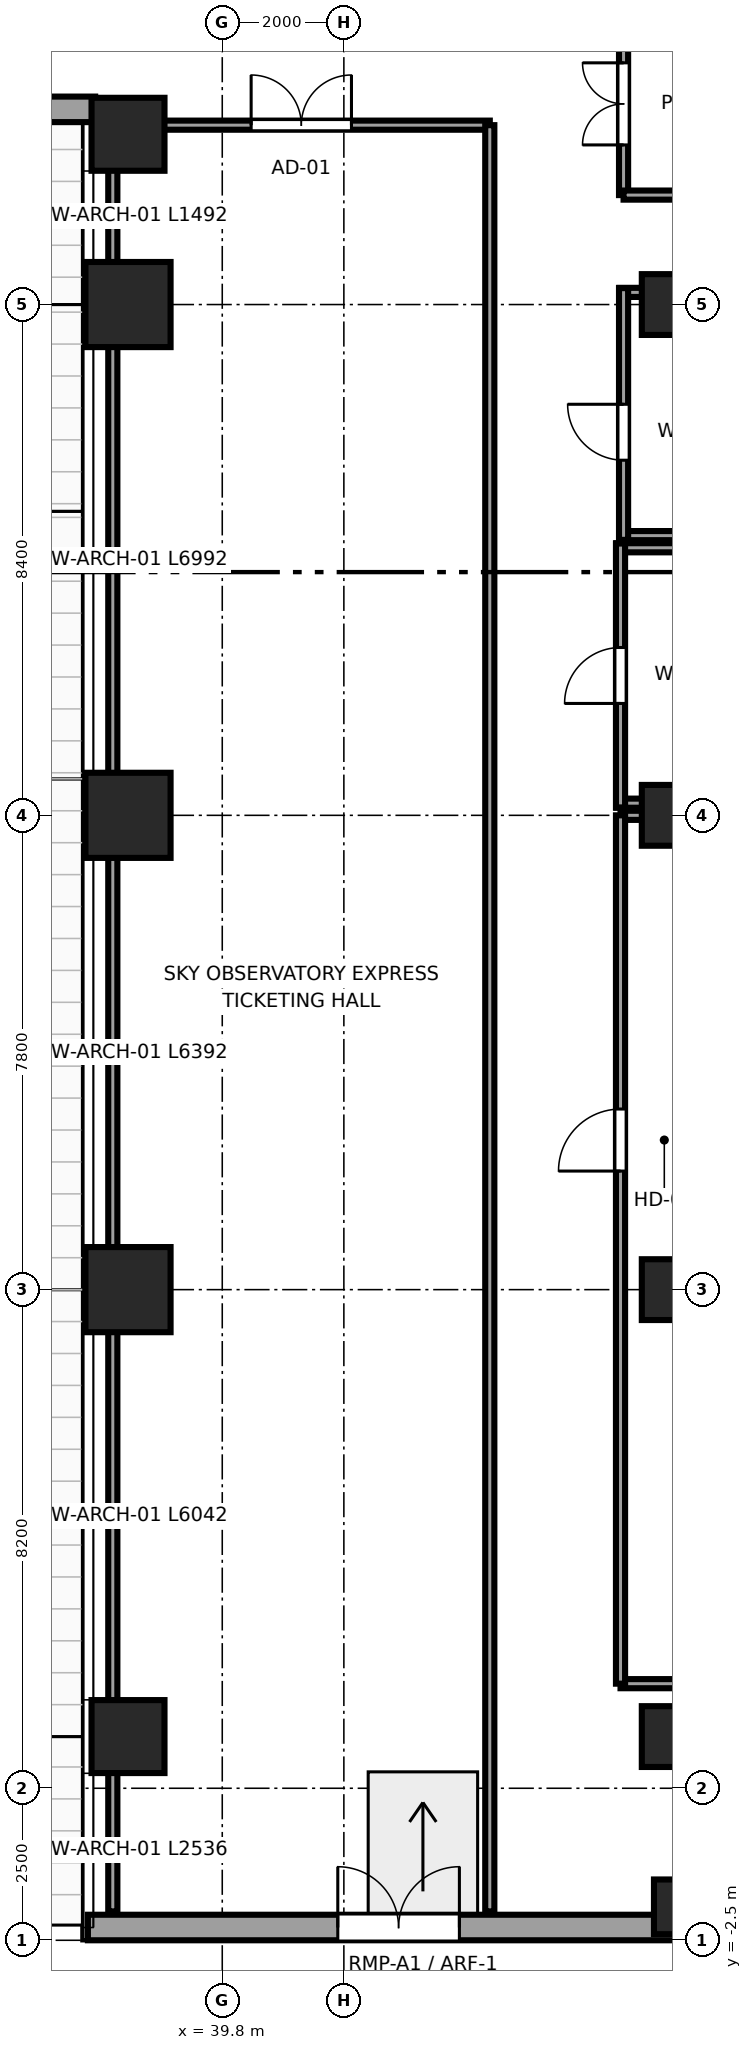
"""IFC4 building model, lengths in metres.
Left out: names, types, materials, properties, quantities, classifications, styles, units other than length and angle.
Written with IfcOpenShell. Run it as: python <this file> out.ifc"""

import sys

from ifc_helpers import new_model, si_unit, direction, frame, frame_2d, origin, origin_2d, place, context, subcontext, project, spatial, rectangle, circle, extrude, source, transform, mapped, element, fill, save


model = new_model("IFC4")
c1 = context("Model", 3, precision=1e-05, world=origin(), true_north=direction((0.0, 1.0)))
c2 = subcontext(c1, "Body", "Model", "MODEL_VIEW")
j1 = project(units=[si_unit("LENGTHUNIT", "METRE"), si_unit("PLANEANGLEUNIT", "RADIAN")], contexts=[c1])
p1 = place(None, origin())
s1 = spatial("IfcSite", under=j1, at=p1, CompositionType="ELEMENT")
p2 = place(p1, origin())
s2 = spatial("IfcBuilding", under=s1, at=p2, CompositionType="ELEMENT")
p3 = place(p2, origin())
s3 = spatial("IfcBuildingStorey", under=s2, at=p3, CompositionType="ELEMENT", Elevation=0.0)
m1 = source(origin(), c2, "Body", "SweptSolid", [
    extrude(circle(Radius=0.6, at=origin_2d()), origin(), (0.0, 0.0, 1.0), 6.0),
])
p4 = place(p3, frame((38.25, 0.85, 0.0), z_axis=(0.0, 0.0, 1.0), x_axis=(1.0, 0.0, 0.0)))
e1 = element("IfcColumn", 1, at=p4, inside=s3, PredefinedType="COLUMN", context=c2, shape_type="MappedRepresentation", body=[
    mapped(m1, transform((0.0, 0.0, 0.0), x_axis=(1.0, 0.0, 0.0), y_axis=(0.0, 1.0, 0.0), z_axis=(0.0, 0.0, 1.0), scale=1.0)),
])
m2 = source(origin(), c2, "Body", "SweptSolid", [
    extrude(rectangle(XDim=1.4, YDim=1.4, at=origin_2d()), origin(), (0.0, 0.0, 1.0), 6.0),
])
for number, where, z_axis, x_axis in (
    (2, (38.25, 8.2, 0.0), (0.0, 0.0, 1.0), (1.0, 0.0, 0.0)),
    (3, (38.25, 16.0, 0.0), (0.0, 0.0, 1.0), (1.0, 0.0, 0.0)),
    (4, (38.25, 24.4, 0.0), (0.0, 0.0, 1.0), (1.0, 0.0, 0.0)),
):
    element("IfcColumn", number, at=place(p3, frame(where, z_axis=z_axis, x_axis=x_axis)), inside=s3, PredefinedType="COLUMN", context=c2, shape_type="MappedRepresentation", body=[
        mapped(m2, transform((0.0, 0.0, 0.0), x_axis=(1.0, 0.0, 0.0), y_axis=(0.0, 1.0, 0.0), z_axis=(0.0, 0.0, 1.0), scale=1.0)),
    ])
p5 = place(p3, frame((38.25, 27.2, 0.0), z_axis=(0.0, 0.0, 1.0), x_axis=(1.0, 0.0, 0.0)))
e5 = element("IfcColumn", 5, at=p5, inside=s3, PredefinedType="COLUMN", context=c2, shape_type="MappedRepresentation", body=[
    mapped(m1, transform((0.0, 0.0, 0.0), x_axis=(1.0, 0.0, 0.0), y_axis=(0.0, 1.0, 0.0), z_axis=(0.0, 0.0, 1.0), scale=1.0)),
])
m3 = source(origin(), c2, "Body", "SweptSolid", [
    extrude(rectangle(XDim=1.0, YDim=1.0, at=origin_2d()), origin(), (0.0, 0.0, 1.0), 6.0),
])
for number, where, z_axis, x_axis in (
    (6, (47.2, 0.85, 0.0), (0.0, 0.0, 1.0), (1.0, 0.0, 0.0)),
    (7, (47.2, 8.2, 0.0), (0.0, 0.0, 1.0), (1.0, 0.0, 0.0)),
    (8, (47.2, 16.0, 0.0), (0.0, 0.0, 1.0), (1.0, 0.0, 0.0)),
    (9, (47.2, 24.4, 0.0), (0.0, 0.0, 1.0), (1.0, 0.0, 0.0)),
):
    element("IfcColumn", number, at=place(p3, frame(where, z_axis=z_axis, x_axis=x_axis)), inside=s3, PredefinedType="COLUMN", context=c2, shape_type="MappedRepresentation", body=[
        mapped(m3, transform((0.0, 0.0, 0.0), x_axis=(1.0, 0.0, 0.0), y_axis=(0.0, 1.0, 0.0), z_axis=(0.0, 0.0, 1.0), scale=1.0)),
    ])
m4 = source(origin(), c2, "Body", "SweptSolid", [
    extrude(rectangle(XDim=0.6, YDim=0.9, at=origin_2d()), origin(), (0.0, 0.0, 1.0), 6.0),
])
p6 = place(p3, frame((47.2, -1.95, 0.0), z_axis=(0.0, 0.0, 1.0), x_axis=(1.0, 0.0, 0.0)))
e10 = element("IfcColumn", 10, at=p6, inside=s3, PredefinedType="PILASTER", context=c2, shape_type="MappedRepresentation", body=[
    mapped(m4, transform((0.0, 0.0, 0.0), x_axis=(1.0, 0.0, 0.0), y_axis=(0.0, 1.0, 0.0), z_axis=(0.0, 0.0, 1.0), scale=1.0)),
])
p7 = place(p3, frame((19.29, 27.61, 0.0), z_axis=(0.0, 0.0, 1.0), x_axis=(1.0, 0.0, 0.0)))
e11 = element("IfcWall", 11, at=p7, inside=s3, PredefinedType="SOLIDWALL", context=c2, shape_type="SweptSolid", body=[
    extrude(rectangle(XDim=18.42, YDim=0.42, at=frame_2d((9.21, 0.0))), origin(), (0.0, 0.0, 1.0), 5.74),
])
p8 = place(p7, frame((1.97, 0.0, 0.65)))
e12 = element("IfcOpeningElement", 12, at=p8, cuts=e11, PredefinedType="OPENING", context=c2, shape_type="SweptSolid", body=[
    extrude(rectangle(XDim=3.0, YDim=2.5, at=frame_2d((1.5, 1.25))), frame((0.0, 0.22, 0.0), z_axis=(0.0, -1.0, 0.0), x_axis=(1.0, 0.0, 0.0)), (0.0, 0.0, 1.0), 0.44),
])
p9 = place(p7, frame((7.71, 0.0, 0.65)))
e13 = element("IfcOpeningElement", 13, at=p9, cuts=e11, PredefinedType="OPENING", context=c2, shape_type="SweptSolid", body=[
    extrude(rectangle(XDim=3.0, YDim=2.5, at=frame_2d((1.5, 1.25))), frame((0.0, 0.22, 0.0), z_axis=(0.0, -1.0, 0.0), x_axis=(1.0, 0.0, 0.0)), (0.0, 0.0, 1.0), 0.44),
])
p10 = place(p7, frame((13.45, 0.0, 0.65)))
e14 = element("IfcOpeningElement", 14, at=p10, cuts=e11, PredefinedType="OPENING", context=c2, shape_type="SweptSolid", body=[
    extrude(rectangle(XDim=3.0, YDim=2.5, at=frame_2d((1.5, 1.25))), frame((0.0, 0.22, 0.0), z_axis=(0.0, -1.0, 0.0), x_axis=(1.0, 0.0, 0.0)), (0.0, 0.0, 1.0), 0.44),
])
p11 = place(p3, frame((37.59, -2.29, 0.0), z_axis=(0.0, 0.0, 1.0), x_axis=(1.0, 0.0, 0.0)))
e15 = element("IfcWall", 15, at=p11, inside=s3, PredefinedType="SOLIDWALL", context=c2, shape_type="SweptSolid", body=[
    extrude(rectangle(XDim=27.6, YDim=0.42, at=frame_2d((13.8, 0.0))), origin(), (0.0, 0.0, 1.0), 5.74),
])
p12 = place(p11, frame((6.11, 0.0, 0.0), z_axis=(0.0, 0.0, 1.0), x_axis=(-1.0, 0.0, 0.0)))
e16 = element("IfcOpeningElement", 16, at=p12, cuts=e15, PredefinedType="OPENING", context=c2, shape_type="SweptSolid", body=[
    extrude(rectangle(XDim=2.0, YDim=2.25, at=frame_2d((1.0, 1.125))), frame((0.0, 0.22, 0.0), z_axis=(0.0, -1.0, 0.0), x_axis=(1.0, 0.0, 0.0)), (0.0, 0.0, 1.0), 0.44),
])
p13 = place(p11, frame((15.21, 0.0, 0.0), z_axis=(0.0, 0.0, 1.0), x_axis=(-1.0, 0.0, 0.0)))
e17 = element("IfcOpeningElement", 17, at=p13, cuts=e15, PredefinedType="OPENING", context=c2, shape_type="SweptSolid", body=[
    extrude(rectangle(XDim=2.0, YDim=2.25, at=frame_2d((1.0, 1.125))), frame((0.0, 0.22, 0.0), z_axis=(0.0, -1.0, 0.0), x_axis=(1.0, 0.0, 0.0)), (0.0, 0.0, 1.0), 0.44),
])
p14 = place(p11, frame((24.01, 0.0, 0.0), z_axis=(0.0, 0.0, 1.0), x_axis=(-1.0, 0.0, 0.0)))
e18 = element("IfcOpeningElement", 18, at=p14, cuts=e15, PredefinedType="OPENING", context=c2, shape_type="SweptSolid", body=[
    extrude(rectangle(XDim=2.0, YDim=2.25, at=frame_2d((1.0, 1.125))), frame((0.0, 0.22, 0.0), z_axis=(0.0, -1.0, 0.0), x_axis=(1.0, 0.0, 0.0)), (0.0, 0.0, 1.0), 0.44),
])
p15 = place(p3, frame((46.4, 26.2, 0.0), z_axis=(0.0, 0.0, 1.0), x_axis=(0.0, 1.0, 0.0)))
e19 = element("IfcWall", 19, at=p15, inside=s3, PredefinedType="PARTITIONING", context=c2, shape_type="SweptSolid", body=[
    extrude(rectangle(XDim=5.2, YDim=0.15, at=frame_2d((2.6, 0.0))), origin(), (0.0, 0.0, 1.0), 5.74),
])
p16 = place(p15, frame((0.825, 0.0, 0.0)))
e20 = element("IfcOpeningElement", 20, at=p16, cuts=e19, PredefinedType="OPENING", context=c2, shape_type="SweptSolid", body=[
    extrude(rectangle(XDim=1.35, YDim=2.15, at=frame_2d((0.675, 1.075))), frame((0.0, 0.085, 0.0), z_axis=(0.0, -1.0, 0.0), x_axis=(1.0, 0.0, 0.0)), (0.0, 0.0, 1.0), 0.17),
])
p17 = place(p3, frame((46.4, 26.2, 0.0), z_axis=(0.0, 0.0, 1.0), x_axis=(1.0, 0.0, 0.0)))
e21 = element("IfcWall", 21, at=p17, inside=s3, PredefinedType="PARTITIONING", context=c2, shape_type="SweptSolid", body=[
    extrude(rectangle(XDim=3.5, YDim=0.15, at=frame_2d((1.75, 0.0))), origin(), (0.0, 0.0, 1.0), 5.74),
])
p18 = place(p3, frame((38.0, 27.35, 0.0), z_axis=(0.0, 0.0, 1.0), x_axis=(1.0, 0.0, 0.0)))
e22 = element("IfcWall", 22, at=p18, inside=s3, PredefinedType="PARTITIONING", context=c2, shape_type="SweptSolid", body=[
    extrude(rectangle(XDim=6.2, YDim=0.15, at=frame_2d((3.1, 0.0))), origin(), (0.0, 0.0, 1.0), 5.74),
])
p19 = place(p18, frame((2.275, 0.0, 0.0)))
e23 = element("IfcOpeningElement", 23, at=p19, cuts=e22, PredefinedType="OPENING", context=c2, shape_type="SweptSolid", body=[
    extrude(rectangle(XDim=1.65, YDim=2.15, at=frame_2d((0.825, 1.075))), frame((0.0, 0.085, 0.0), z_axis=(0.0, -1.0, 0.0), x_axis=(1.0, 0.0, 0.0)), (0.0, 0.0, 1.0), 0.17),
])
p20 = place(p3, frame((38.0, -2.025, 0.0), z_axis=(0.0, 0.0, 1.0), x_axis=(0.0, 1.0, 0.0)))
e24 = element("IfcWall", 24, at=p20, inside=s3, PredefinedType="PARTITIONING", context=c2, shape_type="SweptSolid", body=[
    extrude(rectangle(XDim=29.425, YDim=0.15, at=frame_2d((14.712, 0.0))), origin(), (0.0, 0.0, 1.0), 5.74),
])
p21 = place(p3, frame((44.2, -2.025, 0.0), z_axis=(0.0, 0.0, 1.0), x_axis=(0.0, 1.0, 0.0)))
e25 = element("IfcWall", 25, at=p21, inside=s3, PredefinedType="PARTITIONING", context=c2, shape_type="SweptSolid", body=[
    extrude(rectangle(XDim=29.375, YDim=0.15, at=frame_2d((14.688, 0.0))), origin(), (0.0, 0.0, 1.0), 5.276),
])
p22 = place(p3, frame((46.28, 16.2, 0.0), z_axis=(0.0, 0.0, 1.0), x_axis=(1.0, 0.0, 0.0)))
e26 = element("IfcWall", 26, at=p22, inside=s3, PredefinedType="PARTITIONING", context=c2, shape_type="SweptSolid", body=[
    extrude(rectangle(XDim=1.74, YDim=0.15, at=frame_2d((0.87, 0.0))), origin(), (0.0, 0.0, 1.0), 4.914),
])
p23 = place(p3, frame((46.28, 20.4, 0.0), z_axis=(0.0, 0.0, 1.0), x_axis=(1.0, 0.0, 0.0)))
e27 = element("IfcWall", 27, at=p23, inside=s3, PredefinedType="PARTITIONING", context=c2, shape_type="SweptSolid", body=[
    extrude(rectangle(XDim=1.74, YDim=0.15, at=frame_2d((0.87, 0.0))), origin(), (0.0, 0.0, 1.0), 5.74),
])
p24 = place(p3, frame((46.35, 16.13, 0.0), z_axis=(0.0, 0.0, 1.0), x_axis=(0.0, 1.0, 0.0)))
e28 = element("IfcWall", 28, at=p24, inside=s3, PredefinedType="PARTITIONING", context=c2, shape_type="SweptSolid", body=[
    extrude(rectangle(XDim=4.34, YDim=0.15, at=frame_2d((2.17, 0.0))), origin(), (0.0, 0.0, 1.0), 5.74),
])
p25 = place(p24, frame((1.71, 0.0, 0.0)))
e29 = element("IfcOpeningElement", 29, at=p25, cuts=e28, PredefinedType="OPENING", context=c2, shape_type="SweptSolid", body=[
    extrude(rectangle(XDim=0.92, YDim=2.01, at=frame_2d((0.46, 1.005))), frame((0.0, 0.085, 0.0), z_axis=(0.0, -1.0, 0.0), x_axis=(1.0, 0.0, 0.0)), (0.0, 0.0, 1.0), 0.17),
])
p26 = place(p3, frame((46.33, 20.6, 0.0), z_axis=(0.0, 0.0, 1.0), x_axis=(1.0, 0.0, 0.0)))
e30 = element("IfcWall", 30, at=p26, inside=s3, PredefinedType="PARTITIONING", context=c2, shape_type="SweptSolid", body=[
    extrude(rectangle(XDim=3.64, YDim=0.15, at=frame_2d((1.82, 0.0))), origin(), (0.0, 0.0, 1.0), 5.74),
])
p27 = place(p3, frame((46.33, 24.6, 0.0), z_axis=(0.0, 0.0, 1.0), x_axis=(1.0, 0.0, 0.0)))
e31 = element("IfcWall", 31, at=p27, inside=s3, PredefinedType="PARTITIONING", context=c2, shape_type="SweptSolid", body=[
    extrude(rectangle(XDim=3.64, YDim=0.15, at=frame_2d((1.82, 0.0))), origin(), (0.0, 0.0, 1.0), 4.914),
])
p28 = place(p3, frame((46.4, 20.53, 0.0), z_axis=(0.0, 0.0, 1.0), x_axis=(0.0, 1.0, 0.0)))
e32 = element("IfcWall", 32, at=p28, inside=s3, PredefinedType="PARTITIONING", context=c2, shape_type="SweptSolid", body=[
    extrude(rectangle(XDim=4.14, YDim=0.15, at=frame_2d((2.07, 0.0))), origin(), (0.0, 0.0, 1.0), 5.74),
])
p29 = place(p28, frame((1.31, 0.0, 0.0)))
e33 = element("IfcOpeningElement", 33, at=p29, cuts=e32, PredefinedType="OPENING", context=c2, shape_type="SweptSolid", body=[
    extrude(rectangle(XDim=0.92, YDim=2.01, at=frame_2d((0.46, 1.005))), frame((0.0, 0.085, 0.0), z_axis=(0.0, -1.0, 0.0), x_axis=(1.0, 0.0, 0.0)), (0.0, 0.0, 1.0), 0.17),
])
p30 = place(p3, frame((46.35, 1.72, 0.0), z_axis=(0.0, 0.0, 1.0), x_axis=(1.0, 0.0, 0.0)))
e34 = element("IfcWall", 34, at=p30, inside=s3, PredefinedType="PARTITIONING", context=c2, shape_type="SweptSolid", body=[
    extrude(rectangle(XDim=1.6, YDim=0.15, at=frame_2d((0.8, 0.0))), origin(), (0.0, 0.0, 1.0), 5.74),
])
p31 = place(p3, frame((46.35, 16.0, 0.0), z_axis=(0.0, 0.0, 1.0), x_axis=(1.0, 0.0, 0.0)))
e35 = element("IfcWall", 35, at=p31, inside=s3, PredefinedType="PARTITIONING", context=c2, shape_type="SweptSolid", body=[
    extrude(rectangle(XDim=1.6, YDim=0.15, at=frame_2d((0.8, 0.0))), origin(), (0.0, 0.0, 1.0), 4.914),
])
p32 = place(p3, frame((46.35, 1.72, 0.0), z_axis=(0.0, 0.0, 1.0), x_axis=(0.0, 1.0, 0.0)))
e36 = element("IfcWall", 36, at=p32, inside=s3, PredefinedType="PARTITIONING", context=c2, shape_type="SweptSolid", body=[
    extrude(rectangle(XDim=14.28, YDim=0.15, at=frame_2d((7.14, 0.0))), origin(), (0.0, 0.0, 1.0), 5.74),
])
p33 = place(p32, frame((8.43, 0.0, 0.0)))
e37 = element("IfcOpeningElement", 37, at=p33, cuts=e36, PredefinedType="OPENING", context=c2, shape_type="SweptSolid", body=[
    extrude(rectangle(XDim=1.02, YDim=2.03, at=frame_2d((0.51, 1.015))), frame((0.0, 0.085, 0.0), z_axis=(0.0, -1.0, 0.0), x_axis=(1.0, 0.0, 0.0)), (0.0, 0.0, 1.0), 0.17),
])
m5 = source(origin(), c2, "Body", "SweptSolid", [
    extrude(rectangle(XDim=2.0, YDim=2.25, at=frame_2d((1.0, 1.125))), frame((0.0, 0.025, 0.0), z_axis=(0.0, -1.0, 0.0), x_axis=(1.0, 0.0, 0.0)), (0.0, 0.0, 1.0), 0.05),
])
p34 = place(p12, origin())
e38 = element("IfcDoor", 38, at=p34, inside=s3, OperationType="DOUBLE_DOOR_SINGLE_SWING", PredefinedType="DOOR", context=c2, shape_type="MappedRepresentation", body=[
    mapped(m5, transform((0.0, 0.0, 0.0), x_axis=(1.0, 0.0, 0.0), y_axis=(0.0, 1.0, 0.0), z_axis=(0.0, 0.0, 1.0), scale=1.0)),
])
fill(e16, e38)
m6 = source(origin(), c2, "Body", "SweptSolid", [
    extrude(rectangle(XDim=1.35, YDim=2.15, at=frame_2d((0.675, 1.075))), frame((0.0, 0.025, 0.0), z_axis=(0.0, -1.0, 0.0), x_axis=(1.0, 0.0, 0.0)), (0.0, 0.0, 1.0), 0.05),
])
p35 = place(p16, origin())
e39 = element("IfcDoor", 39, at=p35, inside=s3, OperationType="DOUBLE_DOOR_SINGLE_SWING", PredefinedType="DOOR", context=c2, shape_type="MappedRepresentation", body=[
    mapped(m6, transform((0.0, 0.0, 0.0), x_axis=(1.0, 0.0, 0.0), y_axis=(0.0, 1.0, 0.0), z_axis=(0.0, 0.0, 1.0), scale=1.0)),
])
fill(e20, e39)
m7 = source(origin(), c2, "Body", "SweptSolid", [
    extrude(rectangle(XDim=1.65, YDim=2.15, at=frame_2d((0.825, 1.075))), frame((0.0, 0.025, 0.0), z_axis=(0.0, -1.0, 0.0), x_axis=(1.0, 0.0, 0.0)), (0.0, 0.0, 1.0), 0.05),
])
p36 = place(p19, origin())
e40 = element("IfcDoor", 40, at=p36, inside=s3, OperationType="DOUBLE_DOOR_SINGLE_SWING", PredefinedType="DOOR", context=c2, shape_type="MappedRepresentation", body=[
    mapped(m7, transform((0.0, 0.0, 0.0), x_axis=(1.0, 0.0, 0.0), y_axis=(0.0, 1.0, 0.0), z_axis=(0.0, 0.0, 1.0), scale=1.0)),
])
fill(e23, e40)
m8 = source(origin(), c2, "Body", "SweptSolid", [
    extrude(rectangle(XDim=0.92, YDim=2.01, at=frame_2d((0.46, 1.005))), frame((0.0, 0.025, 0.0), z_axis=(0.0, -1.0, 0.0), x_axis=(1.0, 0.0, 0.0)), (0.0, 0.0, 1.0), 0.05),
])
p37 = place(p25, origin())
e41 = element("IfcDoor", 41, at=p37, inside=s3, OperationType="SINGLE_SWING_LEFT", PredefinedType="DOOR", context=c2, shape_type="MappedRepresentation", body=[
    mapped(m8, transform((0.0, 0.0, 0.0), x_axis=(1.0, 0.0, 0.0), y_axis=(0.0, 1.0, 0.0), z_axis=(0.0, 0.0, 1.0), scale=1.0)),
])
fill(e29, e41)
p38 = place(p29, origin())
e42 = element("IfcDoor", 42, at=p38, inside=s3, OperationType="SINGLE_SWING_RIGHT", PredefinedType="DOOR", context=c2, shape_type="MappedRepresentation", body=[
    mapped(m8, transform((0.0, 0.0, 0.0), x_axis=(1.0, 0.0, 0.0), y_axis=(0.0, 1.0, 0.0), z_axis=(0.0, 0.0, 1.0), scale=1.0)),
])
fill(e33, e42)
m9 = source(origin(), c2, "Body", "SweptSolid", [
    extrude(rectangle(XDim=1.02, YDim=2.03, at=frame_2d((0.51, 1.015))), frame((0.0, 0.025, 0.0), z_axis=(0.0, -1.0, 0.0), x_axis=(1.0, 0.0, 0.0)), (0.0, 0.0, 1.0), 0.05),
])
p39 = place(p33, origin())
e43 = element("IfcDoor", 43, at=p39, inside=s3, OperationType="SINGLE_SWING_LEFT", PredefinedType="DOOR", context=c2, shape_type="MappedRepresentation", body=[
    mapped(m9, transform((0.0, 0.0, 0.0), x_axis=(1.0, 0.0, 0.0), y_axis=(0.0, 1.0, 0.0), z_axis=(0.0, 0.0, 1.0), scale=1.0)),
])
fill(e37, e43)
save(model, sys.argv[1])
